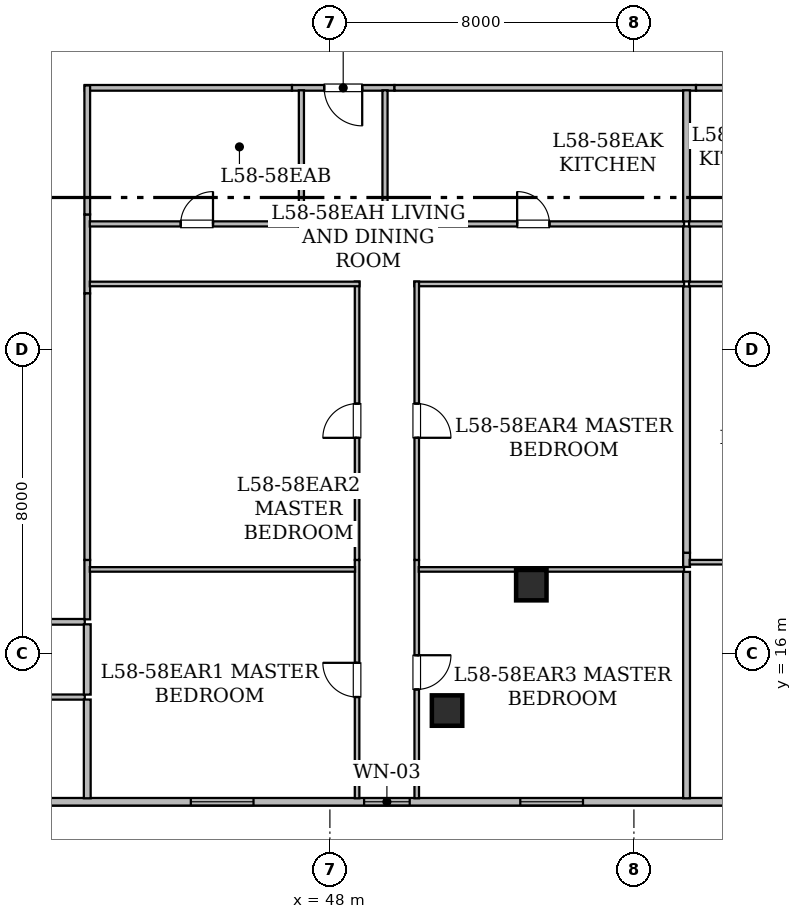
"""IFC4 building model, lengths in metres.
Left out: names, types, materials, properties, quantities, classifications, styles, units other than length and angle.
Written with IfcOpenShell. Run it as: python <this file> out.ifc"""

import sys

from ifc_helpers import new_model, si_unit, direction, frame, frame_2d, origin, origin_2d, place, context, subcontext, project, spatial, rectangle, hollow_rectangle, extrude, element, fill, save


model = new_model("IFC4")
c1 = context("Model", 3, precision=1e-05, world=origin(), true_north=direction((0.0, 1.0)))
c2 = subcontext(c1, "Body", "Model", "MODEL_VIEW")
j1 = project(units=[si_unit("LENGTHUNIT", "METRE"), si_unit("PLANEANGLEUNIT", "RADIAN")], contexts=[c1])
p1 = place(None, origin())
s1 = spatial("IfcSite", under=j1, at=p1, CompositionType="ELEMENT")
p2 = place(p1, origin())
s2 = spatial("IfcBuilding", under=s1, at=p2, CompositionType="ELEMENT")
p3 = place(p2, frame((0.0, 0.0, 228.15)))
s3 = spatial("IfcBuildingStorey", under=s2, at=p3, CompositionType="ELEMENT", Elevation=228.15)
for number, where, z_axis, x_axis in (
    (1, (51.083, 14.5, 0.0), (0.0, 0.0, 1.0), (1.0, 0.0, 0.0)),
    (2, (53.3, 17.8, 0.0), (0.0, 0.0, 1.0), (1.0, 0.0, 0.0)),
):
    element("IfcColumn", number, at=place(p3, frame(where, z_axis=z_axis, x_axis=x_axis)), inside=s3, PredefinedType="COLUMN", context=c2, shape_type="SweptSolid", body=[
        extrude(hollow_rectangle(XDim=0.8, YDim=0.8, WallThickness=0.04, at=origin_2d()), origin(), (0.0, 0.0, 1.0), 3.65),
    ])
p4 = place(p3, frame((65.696, 12.1, 0.0), z_axis=(0.0, 0.0, 1.0), x_axis=(-1.0, 0.0, 0.0)))
e3 = element("IfcWall", 3, at=p4, inside=s3, PredefinedType="STANDARD", context=c2, shape_type="SweptSolid", body=[
    extrude(rectangle(XDim=41.393, YDim=0.2, at=frame_2d((20.697, 0.0))), origin(), (0.0, 0.0, 1.0), 3.43),
])
p5 = place(p4, frame((34.521, 0.0, 0.85)))
e4 = element("IfcOpeningElement", 4, at=p5, cuts=e3, PredefinedType="OPENING", context=c2, shape_type="SweptSolid", body=[
    extrude(rectangle(XDim=1.65, YDim=1.55, at=frame_2d((0.825, 0.775))), frame((0.0, 0.11, 0.0), z_axis=(0.0, -1.0, 0.0), x_axis=(1.0, 0.0, 0.0)), (0.0, 0.0, 1.0), 0.22),
])
p6 = place(p4, frame((39.14, 0.0, 0.85)))
e5 = element("IfcOpeningElement", 5, at=p6, cuts=e3, PredefinedType="OPENING", context=c2, shape_type="SweptSolid", body=[
    extrude(rectangle(XDim=1.65, YDim=1.55, at=frame_2d((0.825, 0.775))), frame((0.0, 0.11, 0.0), z_axis=(0.0, -1.0, 0.0), x_axis=(1.0, 0.0, 0.0)), (0.0, 0.0, 1.0), 0.22),
])
p7 = place(p4, frame((15.596, 0.0, 0.8)))
e6 = element("IfcOpeningElement", 6, at=p7, cuts=e3, PredefinedType="OPENING", context=c2, shape_type="SweptSolid", body=[
    extrude(rectangle(XDim=1.2, YDim=1.5, at=frame_2d((0.6, 0.75))), frame((0.0, 0.11, 0.0), z_axis=(0.0, -1.0, 0.0), x_axis=(1.0, 0.0, 0.0)), (0.0, 0.0, 1.0), 0.22),
])
p8 = place(p4, frame((19.706, 0.0, 0.85)))
e7 = element("IfcOpeningElement", 7, at=p8, cuts=e3, PredefinedType="OPENING", context=c2, shape_type="SweptSolid", body=[
    extrude(rectangle(XDim=1.65, YDim=1.55, at=frame_2d((0.825, 0.775))), frame((0.0, 0.11, 0.0), z_axis=(0.0, -1.0, 0.0), x_axis=(1.0, 0.0, 0.0)), (0.0, 0.0, 1.0), 0.22),
])
p9 = place(p4, frame((11.036, 0.0, 0.85)))
e8 = element("IfcOpeningElement", 8, at=p9, cuts=e3, PredefinedType="OPENING", context=c2, shape_type="SweptSolid", body=[
    extrude(rectangle(XDim=1.65, YDim=1.55, at=frame_2d((0.825, 0.775))), frame((0.0, 0.11, 0.0), z_axis=(0.0, -1.0, 0.0), x_axis=(1.0, 0.0, 0.0)), (0.0, 0.0, 1.0), 0.22),
])
p10 = place(p4, frame((4.786, 0.0, 0.85)))
e9 = element("IfcOpeningElement", 9, at=p10, cuts=e3, PredefinedType="OPENING", context=c2, shape_type="SweptSolid", body=[
    extrude(rectangle(XDim=1.65, YDim=1.55, at=frame_2d((0.825, 0.775))), frame((0.0, 0.11, 0.0), z_axis=(0.0, -1.0, 0.0), x_axis=(1.0, 0.0, 0.0)), (0.0, 0.0, 1.0), 0.22),
])
p11 = place(p3, frame((41.55, 16.835, 0.0), z_axis=(0.0, 0.0, 1.0), x_axis=(-1.0, 0.0, 0.0)))
e10 = element("IfcWall", 10, at=p11, inside=s3, PredefinedType="STANDARD", context=c2, shape_type="SweptSolid", body=[
    extrude(rectangle(XDim=7.436, YDim=0.15, at=frame_2d((3.718, 0.0))), origin(), (0.0, 0.0, 1.0), 2.725),
])
p12 = place(p11, frame((3.218, 0.0, 0.0)))
e11 = element("IfcOpeningElement", 11, at=p12, cuts=e10, PredefinedType="OPENING", context=c2, shape_type="SweptSolid", body=[
    extrude(rectangle(XDim=1.0, YDim=2.15, at=frame_2d((0.5, 1.075))), frame((0.0, 0.085, 0.0), z_axis=(0.0, -1.0, 0.0), x_axis=(1.0, 0.0, 0.0)), (0.0, 0.0, 1.0), 0.17),
])
p13 = place(p3, frame((49.699, 30.885, 0.0), z_axis=(0.0, 0.0, 1.0), x_axis=(-1.0, 0.0, 0.0)))
e12 = element("IfcWall", 12, at=p13, inside=s3, PredefinedType="STANDARD", context=c2, shape_type="SweptSolid", body=[
    extrude(rectangle(XDim=2.698, YDim=0.15, at=frame_2d((1.349, 0.0))), origin(), (0.0, 0.0, 1.0), 3.43),
])
p14 = place(p13, frame((0.849, 0.0, 0.0)))
e13 = element("IfcOpeningElement", 13, at=p14, cuts=e12, PredefinedType="OPENING", context=c2, shape_type="SweptSolid", body=[
    extrude(rectangle(XDim=1.0, YDim=2.15, at=frame_2d((0.5, 1.075))), frame((0.0, 0.085, 0.0), z_axis=(0.0, -1.0, 0.0), x_axis=(1.0, 0.0, 0.0)), (0.0, 0.0, 1.0), 0.17),
])
p15 = place(p3, frame((41.615, 27.554, 0.0), z_axis=(0.0, 0.0, 1.0), x_axis=(0.0, -1.0, 0.0)))
e14 = element("IfcWall", 14, at=p15, inside=s3, PredefinedType="STANDARD", context=c2, shape_type="SweptSolid", body=[
    extrude(rectangle(XDim=2.078, YDim=0.15, at=frame_2d((1.039, 0.0))), origin(), (0.0, 0.0, 1.0), 3.43),
])
p16 = place(p3, frame((47.001, 30.885, 0.0), z_axis=(0.0, 0.0, 1.0), x_axis=(-1.0, 0.0, 0.0)))
e15 = element("IfcWall", 15, at=p16, inside=s3, PredefinedType="STANDARD", context=c2, shape_type="SweptSolid", body=[
    extrude(rectangle(XDim=5.451, YDim=0.15, at=frame_2d((2.726, 0.0))), origin(), (0.0, 0.0, 1.0), 3.43),
])
p17 = place(p3, frame((41.615, 30.948, 0.0), z_axis=(0.0, 0.0, 1.0), x_axis=(0.0, -1.0, 0.0)))
e16 = element("IfcWall", 16, at=p17, inside=s3, PredefinedType="STANDARD", context=c2, shape_type="SweptSolid", body=[
    extrude(rectangle(XDim=3.394, YDim=0.15, at=frame_2d((1.697, 0.0))), origin(), (0.0, 0.0, 1.0), 3.43),
])
p18 = place(p3, frame((57.634, 30.885, 0.0), z_axis=(0.0, 0.0, 1.0), x_axis=(-1.0, 0.0, 0.0)))
e17 = element("IfcWall", 17, at=p18, inside=s3, PredefinedType="STANDARD", context=c2, shape_type="SweptSolid", body=[
    extrude(rectangle(XDim=7.935, YDim=0.15, at=frame_2d((3.968, 0.0))), origin(), (0.0, 0.0, 1.0), 2.725),
])
p19 = place(p3, frame((41.615, 18.463, 0.0), z_axis=(0.0, 0.0, 1.0), x_axis=(0.0, -1.0, 0.0)))
e18 = element("IfcWall", 18, at=p19, inside=s3, PredefinedType="STANDARD", context=c2, shape_type="SweptSolid", body=[
    extrude(rectangle(XDim=1.563, YDim=0.15, at=frame_2d((0.781, 0.0))), origin(), (0.0, 0.0, 1.0), 2.725),
])
p20 = place(p3, frame((41.615, 25.476, 0.0), z_axis=(0.0, 0.0, 1.0), x_axis=(0.0, -1.0, 0.0)))
e19 = element("IfcWall", 19, at=p20, inside=s3, PredefinedType="STANDARD", context=c2, shape_type="SweptSolid", body=[
    extrude(rectangle(XDim=7.013, YDim=0.15, at=frame_2d((3.507, 0.0))), origin(), (0.0, 0.0, 1.0), 2.725),
])
p21 = place(p3, frame((62.142, 30.885, 0.0), z_axis=(0.0, 0.0, 1.0), x_axis=(-1.0, 0.0, 0.0)))
e20 = element("IfcWall", 20, at=p21, inside=s3, PredefinedType="STANDARD", context=c2, shape_type="SweptSolid", body=[
    extrude(rectangle(XDim=4.508, YDim=0.15, at=frame_2d((2.254, 0.0))), origin(), (0.0, 0.0, 1.0), 3.43),
])
p22 = place(p3, frame((41.55, 14.855, 0.0), z_axis=(0.0, 0.0, 1.0), x_axis=(-1.0, 0.0, 0.0)))
e21 = element("IfcWall", 21, at=p22, inside=s3, PredefinedType="PARTITIONING", context=c2, shape_type="SweptSolid", body=[
    extrude(rectangle(XDim=4.018, YDim=0.135, at=frame_2d((2.009, 0.0))), origin(), (0.0, 0.0, 1.0), 2.725),
])
p23 = place(p22, frame((1.233, 0.0, 0.0)))
e22 = element("IfcOpeningElement", 22, at=p23, cuts=e21, PredefinedType="OPENING", context=c2, shape_type="SweptSolid", body=[
    extrude(rectangle(XDim=0.85, YDim=2.1, at=frame_2d((0.425, 1.05))), frame((0.0, 0.077, 0.0), z_axis=(0.0, -1.0, 0.0), x_axis=(1.0, 0.0, 0.0)), (0.0, 0.0, 1.0), 0.155),
])
p24 = place(p3, frame((41.615, 16.77, 0.0), z_axis=(0.0, 0.0, 1.0), x_axis=(0.0, -1.0, 0.0)))
e23 = element("IfcWall", 23, at=p24, inside=s3, PredefinedType="STANDARD", context=c2, shape_type="SweptSolid", body=[
    extrude(rectangle(XDim=1.85, YDim=0.18, at=frame_2d((0.925, 0.0))), origin(), (0.0, 0.0, 1.0), 3.065),
])
p25 = place(p3, frame((41.615, 14.79, 0.0), z_axis=(0.0, 0.0, 1.0), x_axis=(0.0, -1.0, 0.0)))
e24 = element("IfcWall", 24, at=p25, inside=s3, PredefinedType="STANDARD", context=c2, shape_type="SweptSolid", body=[
    extrude(rectangle(XDim=2.598, YDim=0.18, at=frame_2d((1.299, 0.0))), origin(), (0.0, 0.0, 1.0), 2.887),
])
p26 = place(p3, frame((41.682, 27.305, 0.0), z_axis=(0.0, 0.0, 1.0), x_axis=(1.0, 0.0, 0.0)))
e25 = element("IfcWall", 25, at=p26, inside=s3, PredefinedType="PARTITIONING", context=c2, shape_type="SweptSolid", body=[
    extrude(rectangle(XDim=5.633, YDim=0.135, at=frame_2d((2.816, 0.0))), origin(), (0.0, 0.0, 1.0), 3.43),
])
p27 = place(p26, frame((2.392, 0.0, 0.0)))
e26 = element("IfcOpeningElement", 26, at=p27, cuts=e25, PredefinedType="OPENING", context=c2, shape_type="SweptSolid", body=[
    extrude(rectangle(XDim=0.85, YDim=2.1, at=frame_2d((0.425, 1.05))), frame((0.0, 0.077, 0.0), z_axis=(0.0, -1.0, 0.0), x_axis=(1.0, 0.0, 0.0)), (0.0, 0.0, 1.0), 0.155),
])
for number, where, z_axis, x_axis in (
    (27, (47.25, 27.24, 0.0), (0.0, 0.0, 1.0), (0.0, 1.0, 0.0)),
    (28, (49.45, 30.82, 0.0), (0.0, 0.0, 1.0), (0.0, -1.0, 0.0)),
):
    element("IfcWall", number, at=place(p3, frame(where, z_axis=z_axis, x_axis=x_axis)), inside=s3, PredefinedType="PARTITIONING", context=c2, shape_type="SweptSolid", body=[
        extrude(rectangle(XDim=3.58, YDim=0.135, at=frame_2d((1.79, 0.0))), origin(), (0.0, 0.0, 1.0), 3.43),
    ])
p28 = place(p3, frame((49.385, 27.305, 0.0), z_axis=(0.0, 0.0, 1.0), x_axis=(1.0, 0.0, 0.0)))
e29 = element("IfcWall", 29, at=p28, inside=s3, PredefinedType="PARTITIONING", context=c2, shape_type="SweptSolid", body=[
    extrude(rectangle(XDim=7.935, YDim=0.135, at=frame_2d((3.968, 0.0))), origin(), (0.0, 0.0, 1.0), 2.725),
])
p29 = place(p28, frame((3.542, 0.0, 0.0)))
e30 = element("IfcOpeningElement", 30, at=p29, cuts=e29, PredefinedType="OPENING", context=c2, shape_type="SweptSolid", body=[
    extrude(rectangle(XDim=0.85, YDim=2.1, at=frame_2d((0.425, 1.05))), frame((0.0, 0.077, 0.0), z_axis=(0.0, -1.0, 0.0), x_axis=(1.0, 0.0, 0.0)), (0.0, 0.0, 1.0), 0.155),
])
p30 = place(p3, frame((48.715, 12.192, 0.0), z_axis=(0.0, 0.0, 1.0), x_axis=(0.0, 1.0, 0.0)))
e31 = element("IfcWall", 31, at=p30, inside=s3, PredefinedType="PARTITIONING", context=c2, shape_type="SweptSolid", body=[
    extrude(rectangle(XDim=6.271, YDim=0.12, at=frame_2d((3.135, 0.0))), origin(), (0.0, 0.0, 1.0), 2.725),
])
p31 = place(p30, frame((2.664, 0.0, 0.0)))
e32 = element("IfcOpeningElement", 32, at=p31, cuts=e31, PredefinedType="OPENING", context=c2, shape_type="SweptSolid", body=[
    extrude(rectangle(XDim=0.9, YDim=2.1, at=frame_2d((0.45, 1.05))), frame((0.0, 0.07, 0.0), z_axis=(0.0, -1.0, 0.0), x_axis=(1.0, 0.0, 0.0)), (0.0, 0.0, 1.0), 0.14),
])
p32 = place(p3, frame((48.715, 18.463, 0.0), z_axis=(0.0, 0.0, 1.0), x_axis=(0.0, 1.0, 0.0)))
e33 = element("IfcWall", 33, at=p32, inside=s3, PredefinedType="PARTITIONING", context=c2, shape_type="SweptSolid", body=[
    extrude(rectangle(XDim=7.327, YDim=0.12, at=frame_2d((3.664, 0.0))), origin(), (0.0, 0.0, 1.0), 3.43),
])
p33 = place(p32, frame((3.213, 0.0, 0.0)))
e34 = element("IfcOpeningElement", 34, at=p33, cuts=e33, PredefinedType="OPENING", context=c2, shape_type="SweptSolid", body=[
    extrude(rectangle(XDim=0.9, YDim=2.1, at=frame_2d((0.45, 1.05))), frame((0.0, 0.07, 0.0), z_axis=(0.0, -1.0, 0.0), x_axis=(1.0, 0.0, 0.0)), (0.0, 0.0, 1.0), 0.14),
])
p34 = place(p3, frame((48.78, 25.725, 0.0), z_axis=(0.0, 0.0, 1.0), x_axis=(-1.0, 0.0, 0.0)))
e35 = element("IfcWall", 35, at=p34, inside=s3, PredefinedType="PARTITIONING", context=c2, shape_type="SweptSolid", body=[
    extrude(rectangle(XDim=7.098, YDim=0.12, at=frame_2d((3.549, 0.0))), origin(), (0.0, 0.0, 1.0), 3.43),
])
p35 = place(p3, frame((50.285, 18.463, 0.0), z_axis=(0.0, 0.0, 1.0), x_axis=(0.0, -1.0, 0.0)))
e36 = element("IfcWall", 36, at=p35, inside=s3, PredefinedType="PARTITIONING", context=c2, shape_type="SweptSolid", body=[
    extrude(rectangle(XDim=6.271, YDim=0.12, at=frame_2d((3.135, 0.0))), origin(), (0.0, 0.0, 1.0), 2.725),
])
p36 = place(p35, frame((2.507, 0.0, 0.0)))
e37 = element("IfcOpeningElement", 37, at=p36, cuts=e36, PredefinedType="OPENING", context=c2, shape_type="SweptSolid", body=[
    extrude(rectangle(XDim=0.9, YDim=2.1, at=frame_2d((0.45, 1.05))), frame((0.0, 0.07, 0.0), z_axis=(0.0, -1.0, 0.0), x_axis=(1.0, 0.0, 0.0)), (0.0, 0.0, 1.0), 0.14),
])
p37 = place(p3, frame((57.32, 25.725, 0.0), z_axis=(0.0, 0.0, 1.0), x_axis=(-1.0, 0.0, 0.0)))
e38 = element("IfcWall", 38, at=p37, inside=s3, PredefinedType="PARTITIONING", context=c2, shape_type="SweptSolid", body=[
    extrude(rectangle(XDim=7.1, YDim=0.12, at=frame_2d((3.55, 0.0))), origin(), (0.0, 0.0, 1.0), 2.725),
])
p38 = place(p3, frame((50.285, 25.79, 0.0), z_axis=(0.0, 0.0, 1.0), x_axis=(0.0, -1.0, 0.0)))
e39 = element("IfcWall", 39, at=p38, inside=s3, PredefinedType="PARTITIONING", context=c2, shape_type="SweptSolid", body=[
    extrude(rectangle(XDim=7.327, YDim=0.12, at=frame_2d((3.664, 0.0))), origin(), (0.0, 0.0, 1.0), 3.43),
])
p39 = place(p38, frame((3.213, 0.0, 0.0)))
e40 = element("IfcOpeningElement", 40, at=p39, cuts=e39, PredefinedType="OPENING", context=c2, shape_type="SweptSolid", body=[
    extrude(rectangle(XDim=0.9, YDim=2.1, at=frame_2d((0.45, 1.05))), frame((0.0, 0.07, 0.0), z_axis=(0.0, -1.0, 0.0), x_axis=(1.0, 0.0, 0.0)), (0.0, 0.0, 1.0), 0.14),
])
p40 = place(p3, frame((57.385, 27.24, 0.0), z_axis=(0.0, 0.0, 1.0), x_axis=(0.0, -1.0, 0.0)))
e41 = element("IfcWall", 41, at=p40, inside=s3, PredefinedType="STANDARD", context=c2, shape_type="SweptSolid", body=[
    extrude(rectangle(XDim=1.45, YDim=0.18, at=frame_2d((0.725, 0.0))), origin(), (0.0, 0.0, 1.0), 3.43),
])
p41 = place(p3, frame((57.385, 30.82, 0.0), z_axis=(0.0, 0.0, 1.0), x_axis=(0.0, -1.0, 0.0)))
e42 = element("IfcWall", 42, at=p41, inside=s3, PredefinedType="STANDARD", context=c2, shape_type="SweptSolid", body=[
    extrude(rectangle(XDim=3.45, YDim=0.18, at=frame_2d((1.725, 0.0))), origin(), (0.0, 0.0, 1.0), 3.43),
])
p42 = place(p3, frame((41.682, 18.214, 0.0), z_axis=(0.0, 0.0, 1.0), x_axis=(1.0, 0.0, 0.0)))
e43 = element("IfcWall", 43, at=p42, inside=s3, PredefinedType="PARTITIONING", context=c2, shape_type="SweptSolid", body=[
    extrude(rectangle(XDim=6.979, YDim=0.12, at=frame_2d((3.49, 0.0))), origin(), (0.0, 0.0, 1.0), 2.725),
])
p43 = place(p3, frame((50.339, 18.214, 0.0), z_axis=(0.0, 0.0, 1.0), x_axis=(1.0, 0.0, 0.0)))
e44 = element("IfcWall", 44, at=p43, inside=s3, PredefinedType="PARTITIONING", context=c2, shape_type="SweptSolid", body=[
    extrude(rectangle(XDim=6.981, YDim=0.12, at=frame_2d((3.49, 0.0))), origin(), (0.0, 0.0, 1.0), 2.725),
])
p44 = place(p3, frame((57.385, 18.149, 0.0), z_axis=(0.0, 0.0, 1.0), x_axis=(0.0, -1.0, 0.0)))
e45 = element("IfcWall", 45, at=p44, inside=s3, PredefinedType="STANDARD", context=c2, shape_type="SweptSolid", body=[
    extrude(rectangle(XDim=5.957, YDim=0.18, at=frame_2d((2.979, 0.0))), origin(), (0.0, 0.0, 1.0), 2.725),
])
p45 = place(p3, frame((57.385, 18.653, 0.0), z_axis=(0.0, 0.0, 1.0), x_axis=(0.0, -1.0, 0.0)))
e46 = element("IfcWall", 46, at=p45, inside=s3, PredefinedType="STANDARD", context=c2, shape_type="SweptSolid", body=[
    extrude(rectangle(XDim=0.374, YDim=0.18, at=frame_2d((0.187, 0.0))), origin(), (0.0, 0.0, 1.0), 2.725),
])
p46 = place(p3, frame((57.385, 25.66, 0.0), z_axis=(0.0, 0.0, 1.0), x_axis=(0.0, -1.0, 0.0)))
e47 = element("IfcWall", 47, at=p46, inside=s3, PredefinedType="STANDARD", context=c2, shape_type="SweptSolid", body=[
    extrude(rectangle(XDim=7.007, YDim=0.18, at=frame_2d((3.503, 0.0))), origin(), (0.0, 0.0, 1.0), 2.725),
])
p47 = place(p3, frame((57.45, 27.305, 0.0), z_axis=(0.0, 0.0, 1.0), x_axis=(1.0, 0.0, 0.0)))
e48 = element("IfcWall", 48, at=p47, inside=s3, PredefinedType="PARTITIONING", context=c2, shape_type="SweptSolid", body=[
    extrude(rectangle(XDim=5.006, YDim=0.135, at=frame_2d((2.503, 0.0))), origin(), (0.0, 0.0, 1.0), 3.43),
])
p48 = place(p47, frame((2.078, 0.0, 0.0)))
e49 = element("IfcOpeningElement", 49, at=p48, cuts=e48, PredefinedType="OPENING", context=c2, shape_type="SweptSolid", body=[
    extrude(rectangle(XDim=0.85, YDim=2.1, at=frame_2d((0.425, 1.05))), frame((0.0, 0.077, 0.0), z_axis=(0.0, -1.0, 0.0), x_axis=(1.0, 0.0, 0.0)), (0.0, 0.0, 1.0), 0.155),
])
p49 = place(p3, frame((62.85, 25.725, 0.0), z_axis=(0.0, 0.0, 1.0), x_axis=(-1.0, 0.0, 0.0)))
e50 = element("IfcWall", 50, at=p49, inside=s3, PredefinedType="PARTITIONING", context=c2, shape_type="SweptSolid", body=[
    extrude(rectangle(XDim=5.4, YDim=0.12, at=frame_2d((2.7, 0.0))), origin(), (0.0, 0.0, 1.0), 3.43),
])
p50 = place(p3, frame((57.467, 18.404, 0.0), z_axis=(0.0, 0.0, 1.0), x_axis=(1.0, 0.0, 0.0)))
e51 = element("IfcWall", 51, at=p50, inside=s3, PredefinedType="PARTITIONING", context=c2, shape_type="SweptSolid", body=[
    extrude(rectangle(XDim=5.264, YDim=0.12, at=frame_2d((2.632, 0.0))), origin(), (0.0, 0.0, 1.0), 3.43),
])
p51 = place(p7, origin())
e52 = element("IfcWindow", 52, at=p51, inside=s3, PartitioningType="SINGLE_PANEL", PredefinedType="WINDOW", context=c2, shape_type="SweptSolid", body=[
    extrude(rectangle(XDim=1.2, YDim=1.5, at=frame_2d((0.6, 0.75))), frame((0.0, 0.03, 0.0), z_axis=(0.0, -1.0, 0.0), x_axis=(1.0, 0.0, 0.0)), (0.0, 0.0, 1.0), 0.06),
])
fill(e6, e52)
p52 = place(p8, origin())
e53 = element("IfcWindow", 53, at=p52, inside=s3, PartitioningType="SINGLE_PANEL", PredefinedType="WINDOW", context=c2, shape_type="SweptSolid", body=[
    extrude(rectangle(XDim=1.65, YDim=1.55, at=frame_2d((0.825, 0.775))), frame((0.0, 0.03, 0.0), z_axis=(0.0, -1.0, 0.0), x_axis=(1.0, 0.0, 0.0)), (0.0, 0.0, 1.0), 0.06),
])
fill(e7, e53)
p53 = place(p9, origin())
e54 = element("IfcWindow", 54, at=p53, inside=s3, PartitioningType="SINGLE_PANEL", PredefinedType="WINDOW", context=c2, shape_type="SweptSolid", body=[
    extrude(rectangle(XDim=1.65, YDim=1.55, at=frame_2d((0.825, 0.775))), frame((0.0, 0.03, 0.0), z_axis=(0.0, -1.0, 0.0), x_axis=(1.0, 0.0, 0.0)), (0.0, 0.0, 1.0), 0.06),
])
fill(e8, e54)
p54 = place(p14, origin())
e55 = element("IfcDoor", 55, at=p54, inside=s3, OperationType="SINGLE_SWING_LEFT", PredefinedType="DOOR", context=c2, shape_type="SweptSolid", body=[
    extrude(rectangle(XDim=1.0, YDim=2.15, at=frame_2d((0.5, 1.075))), frame((0.0, 0.025, 0.0), z_axis=(0.0, -1.0, 0.0), x_axis=(1.0, 0.0, 0.0)), (0.0, 0.0, 1.0), 0.05),
])
fill(e13, e55)
p55 = place(p27, origin())
e56 = element("IfcDoor", 56, at=p55, inside=s3, OperationType="SINGLE_SWING_RIGHT", PredefinedType="DOOR", context=c2, shape_type="SweptSolid", body=[
    extrude(rectangle(XDim=0.85, YDim=2.1, at=frame_2d((0.425, 1.05))), frame((0.0, 0.025, 0.0), z_axis=(0.0, -1.0, 0.0), x_axis=(1.0, 0.0, 0.0)), (0.0, 0.0, 1.0), 0.05),
])
fill(e26, e56)
p56 = place(p29, origin())
e57 = element("IfcDoor", 57, at=p56, inside=s3, OperationType="SINGLE_SWING_LEFT", PredefinedType="DOOR", context=c2, shape_type="SweptSolid", body=[
    extrude(rectangle(XDim=0.85, YDim=2.1, at=frame_2d((0.425, 1.05))), frame((0.0, 0.025, 0.0), z_axis=(0.0, -1.0, 0.0), x_axis=(1.0, 0.0, 0.0)), (0.0, 0.0, 1.0), 0.05),
])
fill(e30, e57)
p57 = place(p31, origin())
e58 = element("IfcDoor", 58, at=p57, inside=s3, OperationType="SINGLE_SWING_RIGHT", PredefinedType="DOOR", context=c2, shape_type="SweptSolid", body=[
    extrude(rectangle(XDim=0.9, YDim=2.1, at=frame_2d((0.45, 1.05))), frame((0.0, 0.025, 0.0), z_axis=(0.0, -1.0, 0.0), x_axis=(1.0, 0.0, 0.0)), (0.0, 0.0, 1.0), 0.05),
])
fill(e32, e58)
p58 = place(p33, origin())
e59 = element("IfcDoor", 59, at=p58, inside=s3, OperationType="SINGLE_SWING_LEFT", PredefinedType="DOOR", context=c2, shape_type="SweptSolid", body=[
    extrude(rectangle(XDim=0.9, YDim=2.1, at=frame_2d((0.45, 1.05))), frame((0.0, 0.025, 0.0), z_axis=(0.0, -1.0, 0.0), x_axis=(1.0, 0.0, 0.0)), (0.0, 0.0, 1.0), 0.05),
])
fill(e34, e59)
p59 = place(p36, origin())
e60 = element("IfcDoor", 60, at=p59, inside=s3, OperationType="SINGLE_SWING_LEFT", PredefinedType="DOOR", context=c2, shape_type="SweptSolid", body=[
    extrude(rectangle(XDim=0.9, YDim=2.1, at=frame_2d((0.45, 1.05))), frame((0.0, 0.025, 0.0), z_axis=(0.0, -1.0, 0.0), x_axis=(1.0, 0.0, 0.0)), (0.0, 0.0, 1.0), 0.05),
])
fill(e37, e60)
p60 = place(p39, origin())
e61 = element("IfcDoor", 61, at=p60, inside=s3, OperationType="SINGLE_SWING_RIGHT", PredefinedType="DOOR", context=c2, shape_type="SweptSolid", body=[
    extrude(rectangle(XDim=0.9, YDim=2.1, at=frame_2d((0.45, 1.05))), frame((0.0, 0.025, 0.0), z_axis=(0.0, -1.0, 0.0), x_axis=(1.0, 0.0, 0.0)), (0.0, 0.0, 1.0), 0.05),
])
fill(e40, e61)
save(model, sys.argv[1])
